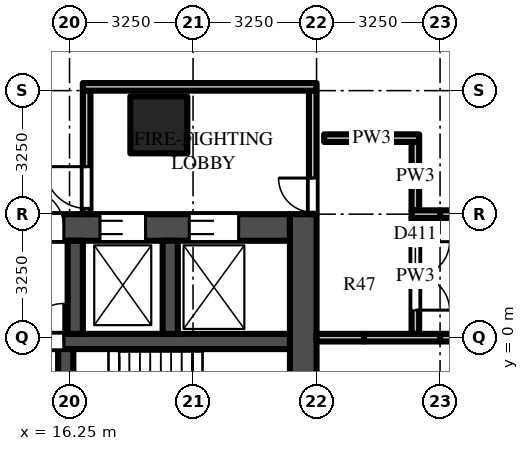
"""IFC4 building model, lengths in metres.
Left out: names, types, materials, properties, quantities, classifications, styles, units other than length and angle.
Written with IfcOpenShell. Run it as: python <this file> out.ifc"""

import sys

from ifc_helpers import new_model, si_unit, direction, frame, frame_2d, origin, origin_2d, place, context, subcontext, project, spatial, rectangle, extrude, source, transform, mapped, element, fill, save


model = new_model("IFC4")
c1 = context("Model", 3, precision=1e-05, world=origin(), true_north=direction((0.0, 1.0)))
c2 = subcontext(c1, "Body", "Model", "MODEL_VIEW")
j1 = project(units=[si_unit("LENGTHUNIT", "METRE"), si_unit("PLANEANGLEUNIT", "RADIAN")], contexts=[c1])
p1 = place(None, origin())
s1 = spatial("IfcSite", under=j1, at=p1, CompositionType="ELEMENT")
p2 = place(p1, origin())
s2 = spatial("IfcBuilding", under=s1, at=p2, CompositionType="ELEMENT")
p3 = place(p2, frame((0.0, 0.0, 19.0)))
s3 = spatial("IfcBuildingStorey", under=s2, at=p3, CompositionType="ELEMENT", Elevation=19.0)
m1 = source(origin(), c2, "Body", "SweptSolid", [
    extrude(rectangle(XDim=1.5, YDim=1.5, at=origin_2d()), origin(), (0.0, 0.0, 1.0), 5.0),
])
p4 = place(p3, frame((18.6, 5.6, 0.0), z_axis=(0.0, 0.0, 1.0), x_axis=(1.0, 0.0, 0.0)))
e1 = element("IfcColumn", 1, at=p4, inside=s3, PredefinedType="COLUMN", context=c2, shape_type="MappedRepresentation", body=[
    mapped(m1, transform((0.0, 0.0, 0.0))),
])
m2 = source(origin(), c2, "Body", "SweptSolid", [
    extrude(rectangle(XDim=14.85, YDim=0.7, at=frame_2d((7.425, 0.0))), origin(), (0.0, 0.0, 1.0), 4.7),
])
p5 = place(p3, frame((7.2, 2.9, 0.0), z_axis=(0.0, 0.0, 1.0), x_axis=(1.0, 0.0, 0.0)))
e2 = element("IfcWall", 2, at=p5, inside=s3, PredefinedType="SHEAR", context=c2, shape_type="MappedRepresentation", body=[
    mapped(m2, transform((0.0, 0.0, 0.0))),
])
m3 = source(origin(), c2, "Body", "SweptSolid", [
    extrude(rectangle(XDim=1.3, YDim=2.1, at=frame_2d((0.65, 1.05))), frame((0.0, 0.36, 0.0), z_axis=(0.0, -1.0, 0.0), x_axis=(1.0, 0.0, 0.0)), (0.0, 0.0, 1.0), 0.72),
])
p6 = place(p5, frame((12.2, 0.0, 0.0)))
e3 = element("IfcOpeningElement", 3, at=p6, cuts=e2, PredefinedType="OPENING", context=c2, shape_type="MappedRepresentation", body=[
    mapped(m3, transform((0.0, 0.0, 0.0))),
])
m4 = source(origin(), c2, "Body", "SweptSolid", [
    extrude(rectangle(XDim=1.2, YDim=2.1, at=frame_2d((0.6, 1.05))), frame((0.0, 0.36, 0.0), z_axis=(0.0, -1.0, 0.0), x_axis=(1.0, 0.0, 0.0)), (0.0, 0.0, 1.0), 0.72),
])
p7 = place(p5, frame((9.85, 0.0, 0.0)))
e4 = element("IfcOpeningElement", 4, at=p7, cuts=e2, PredefinedType="OPENING", context=c2, shape_type="MappedRepresentation", body=[
    mapped(m4, transform((0.0, 0.0, 0.0))),
])
m5 = source(origin(), c2, "Body", "SweptSolid", [
    extrude(rectangle(XDim=1.0, YDim=2.1, at=frame_2d((0.5, 1.05))), frame((0.0, 0.36, 0.0), z_axis=(0.0, -1.0, 0.0), x_axis=(1.0, 0.0, 0.0)), (0.0, 0.0, 1.0), 0.72),
])
p8 = place(p5, frame((7.9, 0.0, 0.0)))
e5 = element("IfcOpeningElement", 5, at=p8, cuts=e2, PredefinedType="OPENING", context=c2, shape_type="MappedRepresentation", body=[
    mapped(m5, transform((0.0, 0.0, 0.0))),
])
m6 = source(origin(), c2, "Body", "SweptSolid", [
    extrude(rectangle(XDim=0.8, YDim=2.1, at=frame_2d((0.4, 1.05))), frame((0.0, 0.36, 0.0), z_axis=(0.0, -1.0, 0.0), x_axis=(1.0, 0.0, 0.0)), (0.0, 0.0, 1.0), 0.72),
])
p9 = place(p5, frame((0.113, 0.0, 0.0)))
e6 = element("IfcOpeningElement", 6, at=p9, cuts=e2, PredefinedType="OPENING", context=c2, shape_type="MappedRepresentation", body=[
    mapped(m6, transform((0.0, 0.0, 0.0))),
])
p10 = place(p5, frame((1.288, 0.0, 0.0)))
e7 = element("IfcOpeningElement", 7, at=p10, cuts=e2, PredefinedType="OPENING", context=c2, shape_type="MappedRepresentation", body=[
    mapped(m6, transform((0.0, 0.0, 0.0))),
])
p11 = place(p5, frame((2.712, 0.0, 0.0)))
e8 = element("IfcOpeningElement", 8, at=p11, cuts=e2, PredefinedType="OPENING", context=c2, shape_type="MappedRepresentation", body=[
    mapped(m6, transform((0.0, 0.0, 0.0))),
])
p12 = place(p5, frame((3.887, 0.0, 0.0)))
e9 = element("IfcOpeningElement", 9, at=p12, cuts=e2, PredefinedType="OPENING", context=c2, shape_type="MappedRepresentation", body=[
    mapped(m6, transform((0.0, 0.0, 0.0))),
])
p13 = place(p5, frame((5.312, 0.0, 0.0)))
e10 = element("IfcOpeningElement", 10, at=p13, cuts=e2, PredefinedType="OPENING", context=c2, shape_type="MappedRepresentation", body=[
    mapped(m6, transform((0.0, 0.0, 0.0))),
])
p14 = place(p5, frame((6.488, 0.0, 0.0)))
e11 = element("IfcOpeningElement", 11, at=p14, cuts=e2, PredefinedType="OPENING", context=c2, shape_type="MappedRepresentation", body=[
    mapped(m6, transform((0.0, 0.0, 0.0))),
])
m7 = source(origin(), c2, "Body", "SweptSolid", [
    extrude(rectangle(XDim=9.05, YDim=0.7, at=frame_2d((4.525, 0.0))), origin(), (0.0, 0.0, 1.0), 4.7),
])
p15 = place(p3, frame((22.4, -5.8, 0.0), z_axis=(0.0, 0.0, 1.0), x_axis=(0.0, 1.0, 0.0)))
e12 = element("IfcWall", 12, at=p15, inside=s3, PredefinedType="SHEAR", context=c2, shape_type="MappedRepresentation", body=[
    mapped(m7, transform((0.0, 0.0, 0.0))),
])
m8 = source(origin(), c2, "Body", "SweptSolid", [
    extrude(rectangle(XDim=14.85, YDim=0.4, at=frame_2d((7.425, 0.0))), origin(), (0.0, 0.0, 1.0), 4.7),
])
p16 = place(p3, frame((7.2, -0.1, 0.0), z_axis=(0.0, 0.0, 1.0), x_axis=(1.0, 0.0, 0.0)))
e13 = element("IfcWall", 13, at=p16, inside=s3, PredefinedType="SHEAR", context=c2, shape_type="MappedRepresentation", body=[
    mapped(m8, transform((0.0, 0.0, 0.0))),
])
m9 = source(origin(), c2, "Body", "SweptSolid", [
    extrude(rectangle(XDim=1.0, YDim=2.1, at=frame_2d((0.5, 1.05))), frame((0.0, 0.21, 0.0), z_axis=(0.0, -1.0, 0.0), x_axis=(1.0, 0.0, 0.0)), (0.0, 0.0, 1.0), 0.42),
])
p17 = place(p16, frame((7.9, 0.0, 0.0)))
e14 = element("IfcOpeningElement", 14, at=p17, cuts=e13, PredefinedType="OPENING", context=c2, shape_type="MappedRepresentation", body=[
    mapped(m9, transform((0.0, 0.0, 0.0))),
])
m10 = source(origin(), c2, "Body", "SweptSolid", [
    extrude(rectangle(XDim=5.5, YDim=0.4, at=frame_2d((2.75, 0.0))), origin(), (0.0, 0.0, 1.0), 4.7),
])
p18 = place(p3, frame((16.15, -5.8, 0.0), z_axis=(0.0, 0.0, 1.0), x_axis=(0.0, 1.0, 0.0)))
e15 = element("IfcWall", 15, at=p18, inside=s3, PredefinedType="SHEAR", context=c2, shape_type="MappedRepresentation", body=[
    mapped(m10, transform((0.0, 0.0, 0.0))),
])
m11 = source(origin(), c2, "Body", "SweptSolid", [
    extrude(rectangle(XDim=1.1, YDim=2.1, at=frame_2d((0.55, 1.05))), frame((0.0, 0.21, 0.0), z_axis=(0.0, -1.0, 0.0), x_axis=(1.0, 0.0, 0.0)), (0.0, 0.0, 1.0), 0.42),
])
p19 = place(p18, frame((0.725, 0.0, 0.0)))
e16 = element("IfcOpeningElement", 16, at=p19, cuts=e15, PredefinedType="OPENING", context=c2, shape_type="MappedRepresentation", body=[
    mapped(m11, transform((0.0, 0.0, 0.0))),
])
p20 = place(p18, frame((3.675, 0.0, 0.0)))
e17 = element("IfcOpeningElement", 17, at=p20, cuts=e15, PredefinedType="OPENING", context=c2, shape_type="MappedRepresentation", body=[
    mapped(m11, transform((0.0, 0.0, 0.0))),
])
m12 = source(origin(), c2, "Body", "SweptSolid", [
    extrude(rectangle(XDim=2.45, YDim=0.4, at=frame_2d((1.225, 0.0))), origin(), (0.0, 0.0, 1.0), 4.7),
])
for number, where, z_axis, x_axis in (
    (18, (16.4, 0.1, 0.0), (0.0, 0.0, 1.0), (0.0, 1.0, 0.0)),
    (19, (18.9, 0.1, 0.0), (0.0, 0.0, 1.0), (0.0, 1.0, 0.0)),
):
    element("IfcWall", number, at=place(p3, frame(where, z_axis=z_axis, x_axis=x_axis)), inside=s3, PredefinedType="SHEAR", context=c2, shape_type="MappedRepresentation", body=[
        mapped(m12, transform((0.0, 0.0, 0.0))),
    ])
m13 = source(origin(), c2, "Body", "SweptSolid", [
    extrude(rectangle(XDim=3.25, YDim=0.2, at=frame_2d((1.625, 0.0))), origin(), (0.0, 0.0, 1.0), 4.7),
])
p21 = place(p3, frame((16.7, 3.25, 0.0), z_axis=(0.0, 0.0, 1.0), x_axis=(0.0, 1.0, 0.0)))
e20 = element("IfcWall", 20, at=p21, inside=s3, PredefinedType="PARTITIONING", context=c2, shape_type="MappedRepresentation", body=[
    mapped(m13, transform((0.0, 0.0, 0.0))),
])
m14 = source(origin(), c2, "Body", "SweptSolid", [
    extrude(rectangle(XDim=1.1, YDim=2.1, at=frame_2d((0.55, 1.05))), frame((0.0, 0.11, 0.0), z_axis=(0.0, -1.0, 0.0), x_axis=(1.0, 0.0, 0.0)), (0.0, 0.0, 1.0), 0.22),
])
p22 = place(p21, frame((0.15, 0.0, 0.0)))
e21 = element("IfcOpeningElement", 21, at=p22, cuts=e20, PredefinedType="OPENING", context=c2, shape_type="MappedRepresentation", body=[
    mapped(m14, transform((0.0, 0.0, 0.0))),
])
p23 = place(p3, frame((22.65, 3.25, 0.0), z_axis=(0.0, 0.0, 1.0), x_axis=(0.0, 1.0, 0.0)))
e22 = element("IfcWall", 22, at=p23, inside=s3, PredefinedType="PARTITIONING", context=c2, shape_type="MappedRepresentation", body=[
    mapped(m13, transform((0.0, 0.0, 0.0))),
])
m15 = source(origin(), c2, "Body", "SweptSolid", [
    extrude(rectangle(XDim=0.9, YDim=2.1, at=frame_2d((0.45, 1.05))), frame((0.0, 0.11, 0.0), z_axis=(0.0, -1.0, 0.0), x_axis=(1.0, 0.0, 0.0)), (0.0, 0.0, 1.0), 0.22),
])
p24 = place(p23, frame((0.05, 0.0, 0.0)))
e23 = element("IfcOpeningElement", 23, at=p24, cuts=e22, PredefinedType="OPENING", context=c2, shape_type="MappedRepresentation", body=[
    mapped(m15, transform((0.0, 0.0, 0.0))),
])
m16 = source(origin(), c2, "Body", "SweptSolid", [
    extrude(rectangle(XDim=6.15, YDim=0.2, at=frame_2d((3.075, 0.0))), origin(), (0.0, 0.0, 1.0), 4.7),
])
p25 = place(p3, frame((16.6, 6.6, 0.0), z_axis=(0.0, 0.0, 1.0), x_axis=(1.0, 0.0, 0.0)))
e24 = element("IfcWall", 24, at=p25, inside=s3, PredefinedType="PARTITIONING", context=c2, shape_type="MappedRepresentation", body=[
    mapped(m16, transform((0.0, 0.0, 0.0))),
])
m17 = source(origin(), c2, "Body", "SweptSolid", [
    extrude(rectangle(XDim=3.05, YDim=0.2, at=frame_2d((1.525, 0.0))), origin(), (0.0, 0.0, 1.0), 4.077),
])
p26 = place(p3, frame((25.35, 3.15, 0.0), z_axis=(0.0, 0.0, 1.0), x_axis=(0.0, -1.0, 0.0)))
e25 = element("IfcWall", 25, at=p26, inside=s3, PredefinedType="PARTITIONING", context=c2, shape_type="MappedRepresentation", body=[
    mapped(m17, transform((0.0, 0.0, 0.0))),
])
m18 = source(origin(), c2, "Body", "SweptSolid", [
    extrude(rectangle(XDim=1.8, YDim=2.1, at=frame_2d((0.9, 1.05))), frame((0.0, 0.11, 0.0), z_axis=(0.0, -1.0, 0.0), x_axis=(1.0, 0.0, 0.0)), (0.0, 0.0, 1.0), 0.22),
])
p27 = place(p26, frame((0.625, 0.0, 0.0)))
e26 = element("IfcOpeningElement", 26, at=p27, cuts=e25, PredefinedType="OPENING", context=c2, shape_type="MappedRepresentation", body=[
    mapped(m18, transform((0.0, 0.0, 0.0))),
])
m19 = source(origin(), c2, "Body", "SweptSolid", [
    extrude(rectangle(XDim=1.8, YDim=0.2, at=frame_2d((0.9, 0.0))), origin(), (0.0, 0.0, 1.0), 4.7),
])
p28 = place(p3, frame((25.35, 3.35, 0.0), z_axis=(0.0, 0.0, 1.0), x_axis=(0.0, 1.0, 0.0)))
e27 = element("IfcWall", 27, at=p28, inside=s3, PredefinedType="PARTITIONING", context=c2, shape_type="MappedRepresentation", body=[
    mapped(m19, transform((0.0, 0.0, 0.0))),
])
m20 = source(origin(), c2, "Body", "SweptSolid", [
    extrude(rectangle(XDim=1.25, YDim=0.2, at=frame_2d((0.625, 0.0))), origin(), (0.0, 0.0, 1.0), 4.077),
])
p29 = place(p3, frame((22.75, 0.0, 0.0), z_axis=(0.0, 0.0, 1.0), x_axis=(1.0, 0.0, 0.0)))
e28 = element("IfcWall", 28, at=p29, inside=s3, PredefinedType="PARTITIONING", context=c2, shape_type="MappedRepresentation", body=[
    mapped(m20, transform((0.0, 0.0, 0.0))),
])
m21 = source(origin(), c2, "Body", "SweptSolid", [
    extrude(rectangle(XDim=3.25, YDim=0.2, at=frame_2d((1.625, 0.0))), origin(), (0.0, 0.0, 1.0), 4.077),
])
p30 = place(p3, frame((29.25, 0.0, 0.0), z_axis=(0.0, 0.0, 1.0), x_axis=(-1.0, 0.0, 0.0)))
e29 = element("IfcWall", 29, at=p30, inside=s3, PredefinedType="PARTITIONING", context=c2, shape_type="MappedRepresentation", body=[
    mapped(m21, transform((0.0, 0.0, 0.0))),
])
p31 = place(p30, frame((0.725, 0.0, 0.0)))
e30 = element("IfcOpeningElement", 30, at=p31, cuts=e29, PredefinedType="OPENING", context=c2, shape_type="MappedRepresentation", body=[
    mapped(m18, transform((0.0, 0.0, 0.0))),
])
m22 = source(origin(), c2, "Body", "SweptSolid", [
    extrude(rectangle(XDim=2.0, YDim=0.2, at=frame_2d((1.0, 0.0))), origin(), (0.0, 0.0, 1.0), 4.077),
])
p32 = place(p3, frame((26.0, 0.0, 0.0), z_axis=(0.0, 0.0, 1.0), x_axis=(-1.0, 0.0, 0.0)))
e31 = element("IfcWall", 31, at=p32, inside=s3, PredefinedType="PARTITIONING", context=c2, shape_type="MappedRepresentation", body=[
    mapped(m22, transform((0.0, 0.0, 0.0))),
])
p33 = place(p3, frame((26.0, 3.25, 0.0), z_axis=(0.0, 0.0, 1.0), x_axis=(1.0, 0.0, 0.0)))
e32 = element("IfcWall", 32, at=p33, inside=s3, PredefinedType="PARTITIONING", context=c2, shape_type="MappedRepresentation", body=[
    mapped(m13, transform((0.0, 0.0, 0.0))),
])
p34 = place(p33, frame((0.725, 0.0, 0.0)))
e33 = element("IfcOpeningElement", 33, at=p34, cuts=e32, PredefinedType="OPENING", context=c2, shape_type="MappedRepresentation", body=[
    mapped(m18, transform((0.0, 0.0, 0.0))),
])
m23 = source(origin(), c2, "Body", "SweptSolid", [
    extrude(rectangle(XDim=0.75, YDim=0.2, at=frame_2d((0.375, 0.0))), origin(), (0.0, 0.0, 1.0), 4.7),
])
p35 = place(p3, frame((25.25, 3.25, 0.0), z_axis=(0.0, 0.0, 1.0), x_axis=(1.0, 0.0, 0.0)))
e34 = element("IfcWall", 34, at=p35, inside=s3, PredefinedType="PARTITIONING", context=c2, shape_type="MappedRepresentation", body=[
    mapped(m23, transform((0.0, 0.0, 0.0))),
])
m24 = source(origin(), c2, "Body", "SweptSolid", [
    extrude(rectangle(XDim=1.05, YDim=0.2, at=frame_2d((0.525, 0.0))), origin(), (0.0, 0.0, 1.0), 4.7),
])
p36 = place(p3, frame((22.95, 5.25, 0.0), z_axis=(0.0, 0.0, 1.0), x_axis=(1.0, 0.0, 0.0)))
e35 = element("IfcWall", 35, at=p36, inside=s3, PredefinedType="PARTITIONING", context=c2, shape_type="MappedRepresentation", body=[
    mapped(m24, transform((0.0, 0.0, 0.0))),
])
m25 = source(origin(), c2, "Body", "SweptSolid", [
    extrude(rectangle(XDim=1.45, YDim=0.2, at=frame_2d((0.725, 0.0))), origin(), (0.0, 0.0, 1.0), 4.7),
])
p37 = place(p3, frame((24.0, 5.25, 0.0), z_axis=(0.0, 0.0, 1.0), x_axis=(1.0, 0.0, 0.0)))
e36 = element("IfcWall", 36, at=p37, inside=s3, PredefinedType="PARTITIONING", context=c2, shape_type="MappedRepresentation", body=[
    mapped(m25, transform((0.0, 0.0, 0.0))),
])
m26 = source(origin(), c2, "Body", "SweptSolid", [
    extrude(rectangle(XDim=1.3, YDim=2.1, at=frame_2d((0.65, 1.05))), frame((0.0, -0.275, 0.0), z_axis=(0.0, -1.0, 0.0), x_axis=(1.0, 0.0, 0.0)), (0.0, 0.0, 1.0), 0.05),
])
p38 = place(p6, origin())
e37 = element("IfcDoor", 37, at=p38, inside=s3, OperationType="DOUBLE_DOOR_SLIDING", PredefinedType="DOOR", context=c2, shape_type="MappedRepresentation", body=[
    mapped(m26, transform((0.0, 0.0, 0.0))),
])
fill(e3, e37)
m27 = source(origin(), c2, "Body", "SweptSolid", [
    extrude(rectangle(XDim=1.2, YDim=2.1, at=frame_2d((0.6, 1.05))), frame((0.0, -0.275, 0.0), z_axis=(0.0, -1.0, 0.0), x_axis=(1.0, 0.0, 0.0)), (0.0, 0.0, 1.0), 0.05),
])
p39 = place(p7, origin())
e38 = element("IfcDoor", 38, at=p39, inside=s3, OperationType="DOUBLE_DOOR_SLIDING", PredefinedType="DOOR", context=c2, shape_type="MappedRepresentation", body=[
    mapped(m27, transform((0.0, 0.0, 0.0))),
])
fill(e4, e38)
m28 = source(origin(), c2, "Body", "SweptSolid", [
    extrude(rectangle(XDim=1.0, YDim=2.1, at=frame_2d((0.5, 1.05))), frame((0.0, 0.025, 0.0), z_axis=(0.0, -1.0, 0.0), x_axis=(1.0, 0.0, 0.0)), (0.0, 0.0, 1.0), 0.05),
])
p40 = place(p17, origin())
e39 = element("IfcDoor", 39, at=p40, inside=s3, OperationType="SINGLE_SWING_RIGHT", PredefinedType="DOOR", context=c2, shape_type="MappedRepresentation", body=[
    mapped(m28, transform((0.0, 0.0, 0.0))),
])
fill(e14, e39)
m29 = source(origin(), c2, "Body", "SweptSolid", [
    extrude(rectangle(XDim=1.0, YDim=2.1, at=frame_2d((0.5, 1.05))), frame((0.0, -0.275, 0.0), z_axis=(0.0, -1.0, 0.0), x_axis=(1.0, 0.0, 0.0)), (0.0, 0.0, 1.0), 0.05),
])
p41 = place(p8, origin())
e40 = element("IfcDoor", 40, at=p41, inside=s3, OperationType="SINGLE_SWING_LEFT", PredefinedType="DOOR", context=c2, shape_type="MappedRepresentation", body=[
    mapped(m29, transform((0.0, 0.0, 0.0))),
])
fill(e5, e40)
m30 = source(origin(), c2, "Body", "SweptSolid", [
    extrude(rectangle(XDim=1.1, YDim=2.1, at=frame_2d((0.55, 1.05))), frame((0.0, 0.025, 0.0), z_axis=(0.0, -1.0, 0.0), x_axis=(1.0, 0.0, 0.0)), (0.0, 0.0, 1.0), 0.05),
])
p42 = place(p22, origin())
e41 = element("IfcDoor", 41, at=p42, inside=s3, OperationType="SINGLE_SWING_RIGHT", PredefinedType="DOOR", context=c2, shape_type="MappedRepresentation", body=[
    mapped(m30, transform((0.0, 0.0, 0.0))),
])
fill(e21, e41)
m31 = source(origin(), c2, "Body", "SweptSolid", [
    extrude(rectangle(XDim=0.9, YDim=2.1, at=frame_2d((0.45, 1.05))), frame((0.0, 0.025, 0.0), z_axis=(0.0, -1.0, 0.0), x_axis=(1.0, 0.0, 0.0)), (0.0, 0.0, 1.0), 0.05),
])
p43 = place(p24, origin())
e42 = element("IfcDoor", 42, at=p43, inside=s3, OperationType="SINGLE_SWING_RIGHT", PredefinedType="DOOR", context=c2, shape_type="MappedRepresentation", body=[
    mapped(m31, transform((0.0, 0.0, 0.0))),
])
fill(e23, e42)
m32 = source(origin(), c2, "Body", "SweptSolid", [
    extrude(rectangle(XDim=1.8, YDim=2.1, at=frame_2d((0.9, 1.05))), frame((0.0, 0.025, 0.0), z_axis=(0.0, -1.0, 0.0), x_axis=(1.0, 0.0, 0.0)), (0.0, 0.0, 1.0), 0.05),
])
p44 = place(p27, origin())
e43 = element("IfcDoor", 43, at=p44, inside=s3, OperationType="DOUBLE_DOOR_SINGLE_SWING", PredefinedType="DOOR", context=c2, shape_type="MappedRepresentation", body=[
    mapped(m32, transform((0.0, 0.0, 0.0))),
])
fill(e26, e43)
save(model, sys.argv[1])
